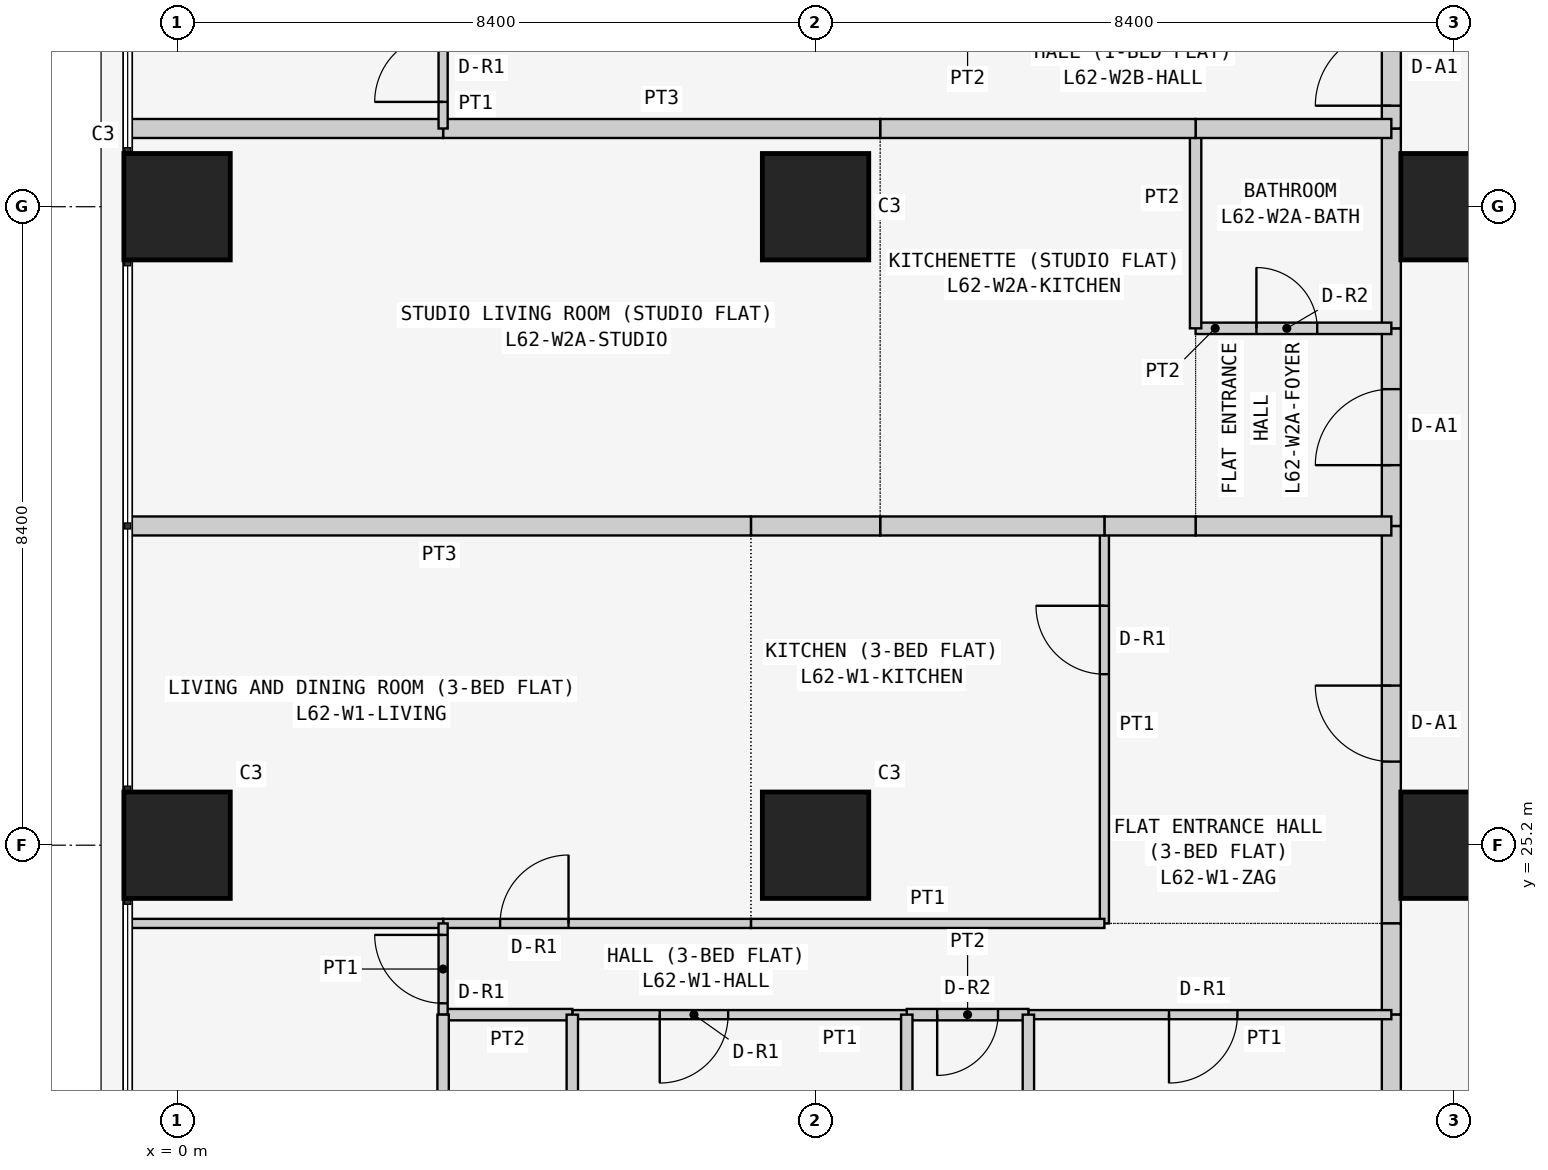
"""IFC4 building model, lengths in metres.
Left out: names, types, materials, properties, quantities, classifications, styles, units other than length and angle.
Written with IfcOpenShell. Run it as: python <this file> out.ifc"""

import sys

from ifc_helpers import new_model, si_unit, direction, frame, frame_2d, origin, origin_2d, place, context, subcontext, project, spatial, rectangle, extrude, element, fill, save


model = new_model("IFC4")
c1 = context("Model", 3, precision=1e-05, world=origin(), true_north=direction((0.0, 1.0)))
c2 = subcontext(c1, "Body", "Model", "MODEL_VIEW")
j1 = project(units=[si_unit("LENGTHUNIT", "METRE"), si_unit("PLANEANGLEUNIT", "RADIAN")], contexts=[c1])
p1 = place(None, origin())
s1 = spatial("IfcSite", under=j1, at=p1, CompositionType="ELEMENT")
p2 = place(p1, origin())
s2 = spatial("IfcBuilding", under=s1, at=p2, CompositionType="ELEMENT")
p3 = place(p2, frame((0.0, 0.0, 237.3)))
s3 = spatial("IfcBuildingStorey", under=s2, at=p3, CompositionType="ELEMENT", Elevation=237.3)
for number, where, z_axis, x_axis in (
    (1, (0.0, 25.2, 0.0), (0.0, 0.0, 1.0), (1.0, 0.0, 0.0)),
    (2, (0.0, 33.6, 0.0), (0.0, 0.0, 1.0), (1.0, 0.0, 0.0)),
    (3, (8.4, 25.2, 0.0), (0.0, 0.0, 1.0), (1.0, 0.0, 0.0)),
    (4, (8.4, 33.6, 0.0), (0.0, 0.0, 1.0), (1.0, 0.0, 0.0)),
    (5, (16.8, 25.2, 0.0), (0.0, 0.0, 1.0), (1.0, 0.0, 0.0)),
    (6, (16.8, 33.6, 0.0), (0.0, 0.0, 1.0), (1.0, 0.0, 0.0)),
):
    element("IfcColumn", number, at=place(p3, frame(where, z_axis=z_axis, x_axis=x_axis)), inside=s3, PredefinedType="COLUMN", context=c2, shape_type="SweptSolid", body=[
        extrude(rectangle(XDim=1.4, YDim=1.4, at=origin_2d()), origin(), (0.0, 0.0, 1.0), 3.6),
    ])
p4 = place(p3, frame((15.975, 24.171, 0.0), z_axis=(0.0, 0.0, 1.0), x_axis=(0.0, 1.0, 0.0)))
e7 = element("IfcWall", 7, at=p4, inside=s3, PredefinedType="PARTITIONING", context=c2, shape_type="SweptSolid", body=[
    extrude(rectangle(XDim=5.229, YDim=0.25, at=frame_2d((2.615, 0.0))), origin(), (0.0, 0.0, 1.0), 3.45),
])
p5 = place(p4, frame((2.129, 0.0, 0.0)))
e8 = element("IfcOpeningElement", 8, at=p5, cuts=e7, PredefinedType="OPENING", context=c2, shape_type="SweptSolid", body=[
    extrude(rectangle(XDim=1.0, YDim=2.1, at=frame_2d((0.5, 1.05))), frame((0.0, 0.135, 0.0), z_axis=(0.0, -1.0, 0.0), x_axis=(1.0, 0.0, 0.0)), (0.0, 0.0, 1.0), 0.27),
])
p6 = place(p3, frame((15.975, 22.971, 0.0), z_axis=(0.0, 0.0, 1.0), x_axis=(0.0, 1.0, 0.0)))
e9 = element("IfcWall", 9, at=p6, inside=s3, PredefinedType="PARTITIONING", context=c2, shape_type="SweptSolid", body=[
    extrude(rectangle(XDim=1.2, YDim=0.25, at=frame_2d((0.6, 0.0))), origin(), (0.0, 0.0, 1.0), 3.45),
])
p7 = place(p3, frame((15.975, 16.1, 0.0), z_axis=(0.0, 0.0, 1.0), x_axis=(0.0, 1.0, 0.0)))
e10 = element("IfcWall", 10, at=p7, inside=s3, PredefinedType="PARTITIONING", context=c2, shape_type="SweptSolid", body=[
    extrude(rectangle(XDim=6.871, YDim=0.25, at=frame_2d((3.436, 0.0))), origin(), (0.0, 0.0, 1.0), 3.45),
])
p8 = place(p3, frame((15.975, 29.4, 0.0), z_axis=(0.0, 0.0, 1.0), x_axis=(0.0, 1.0, 0.0)))
e11 = element("IfcWall", 11, at=p8, inside=s3, PredefinedType="PARTITIONING", context=c2, shape_type="SweptSolid", body=[
    extrude(rectangle(XDim=2.6, YDim=0.25, at=frame_2d((1.3, 0.0))), origin(), (0.0, 0.0, 1.0), 3.45),
])
p9 = place(p8, frame((0.8, 0.0, 0.0)))
e12 = element("IfcOpeningElement", 12, at=p9, cuts=e11, PredefinedType="OPENING", context=c2, shape_type="SweptSolid", body=[
    extrude(rectangle(XDim=1.0, YDim=2.1, at=frame_2d((0.5, 1.05))), frame((0.0, 0.135, 0.0), z_axis=(0.0, -1.0, 0.0), x_axis=(1.0, 0.0, 0.0)), (0.0, 0.0, 1.0), 0.27),
])
p10 = place(p3, frame((15.975, 32.0, 0.0), z_axis=(0.0, 0.0, 1.0), x_axis=(0.0, 1.0, 0.0)))
e13 = element("IfcWall", 13, at=p10, inside=s3, PredefinedType="PARTITIONING", context=c2, shape_type="SweptSolid", body=[
    extrude(rectangle(XDim=2.629, YDim=0.25, at=frame_2d((1.314, 0.0))), origin(), (0.0, 0.0, 1.0), 3.45),
])
p11 = place(p3, frame((15.975, 34.629, 0.0), z_axis=(0.0, 0.0, 1.0), x_axis=(0.0, 1.0, 0.0)))
e14 = element("IfcWall", 14, at=p11, inside=s3, PredefinedType="PARTITIONING", context=c2, shape_type="SweptSolid", body=[
    extrude(rectangle(XDim=1.6, YDim=0.25, at=frame_2d((0.8, 0.0))), origin(), (0.0, 0.0, 1.0), 3.45),
])
p12 = place(p11, frame((0.3, 0.0, 0.0)))
e15 = element("IfcOpeningElement", 15, at=p12, cuts=e14, PredefinedType="OPENING", context=c2, shape_type="SweptSolid", body=[
    extrude(rectangle(XDim=1.0, YDim=2.1, at=frame_2d((0.5, 1.05))), frame((0.0, 0.135, 0.0), z_axis=(0.0, -1.0, 0.0), x_axis=(1.0, 0.0, 0.0)), (0.0, 0.0, 1.0), 0.27),
])
p13 = place(p3, frame((12.2, 29.4, 0.0), z_axis=(0.0, 0.0, 1.0), x_axis=(0.0, -1.0, 0.0)))
e16 = element("IfcWall", 16, at=p13, inside=s3, PredefinedType="PARTITIONING", context=c2, shape_type="SweptSolid", body=[
    extrude(rectangle(XDim=5.229, YDim=0.12, at=frame_2d((2.615, 0.0))), origin(), (0.0, 0.0, 1.0), 3.45),
])
p14 = place(p13, frame((1.05, 0.0, 0.0)))
e17 = element("IfcOpeningElement", 17, at=p14, cuts=e16, PredefinedType="OPENING", context=c2, shape_type="SweptSolid", body=[
    extrude(rectangle(XDim=0.9, YDim=2.1, at=frame_2d((0.45, 1.05))), frame((0.0, 0.07, 0.0), z_axis=(0.0, -1.0, 0.0), x_axis=(1.0, 0.0, 0.0)), (0.0, 0.0, 1.0), 0.14),
])
p15 = place(p3, frame((15.975, 29.4, 0.0), z_axis=(0.0, 0.0, 1.0), x_axis=(-1.0, 0.0, 0.0)))
e18 = element("IfcWall", 18, at=p15, inside=s3, PredefinedType="PARTITIONING", context=c2, shape_type="SweptSolid", body=[
    extrude(rectangle(XDim=2.575, YDim=0.25, at=frame_2d((1.288, 0.0))), origin(), (0.0, 0.0, 1.0), 3.45),
])
p16 = place(p3, frame((13.4, 29.4, 0.0), z_axis=(0.0, 0.0, 1.0), x_axis=(-1.0, 0.0, 0.0)))
e19 = element("IfcWall", 19, at=p16, inside=s3, PredefinedType="PARTITIONING", context=c2, shape_type="SweptSolid", body=[
    extrude(rectangle(XDim=1.2, YDim=0.25, at=frame_2d((0.6, 0.0))), origin(), (0.0, 0.0, 1.0), 3.45),
])
p17 = place(p3, frame((7.55, 24.171, 0.0), z_axis=(0.0, 0.0, 1.0), x_axis=(1.0, 0.0, 0.0)))
e20 = element("IfcWall", 20, at=p17, inside=s3, PredefinedType="PARTITIONING", context=c2, shape_type="SweptSolid", body=[
    extrude(rectangle(XDim=4.65, YDim=0.12, at=frame_2d((2.325, 0.0))), origin(), (0.0, 0.0, 1.0), 3.45),
])
p18 = place(p3, frame((12.2, 29.4, 0.0), z_axis=(0.0, 0.0, 1.0), x_axis=(-1.0, 0.0, 0.0)))
e21 = element("IfcWall", 21, at=p18, inside=s3, PredefinedType="PARTITIONING", context=c2, shape_type="SweptSolid", body=[
    extrude(rectangle(XDim=2.95, YDim=0.25, at=frame_2d((1.475, 0.0))), origin(), (0.0, 0.0, 1.0), 3.45),
])
p19 = place(p3, frame((9.25, 29.4, 0.0), z_axis=(0.0, 0.0, 1.0), x_axis=(-1.0, 0.0, 0.0)))
e22 = element("IfcWall", 22, at=p19, inside=s3, PredefinedType="PARTITIONING", context=c2, shape_type="SweptSolid", body=[
    extrude(rectangle(XDim=1.7, YDim=0.25, at=frame_2d((0.85, 0.0))), origin(), (0.0, 0.0, 1.0), 3.45),
])
p20 = place(p3, frame((3.5, 24.171, 0.0), z_axis=(0.0, 0.0, 1.0), x_axis=(1.0, 0.0, 0.0)))
e23 = element("IfcWall", 23, at=p20, inside=s3, PredefinedType="PARTITIONING", context=c2, shape_type="SweptSolid", body=[
    extrude(rectangle(XDim=4.05, YDim=0.12, at=frame_2d((2.025, 0.0))), origin(), (0.0, 0.0, 1.0), 3.45),
])
p21 = place(p20, frame((0.75, 0.0, 0.0)))
e24 = element("IfcOpeningElement", 24, at=p21, cuts=e23, PredefinedType="OPENING", context=c2, shape_type="SweptSolid", body=[
    extrude(rectangle(XDim=0.9, YDim=2.1, at=frame_2d((0.45, 1.05))), frame((0.0, 0.07, 0.0), z_axis=(0.0, -1.0, 0.0), x_axis=(1.0, 0.0, 0.0)), (0.0, 0.0, 1.0), 0.14),
])
p22 = place(p3, frame((-0.65, 24.171, 0.0), z_axis=(0.0, 0.0, 1.0), x_axis=(1.0, 0.0, 0.0)))
e25 = element("IfcWall", 25, at=p22, inside=s3, PredefinedType="PARTITIONING", context=c2, shape_type="SweptSolid", body=[
    extrude(rectangle(XDim=4.15, YDim=0.12, at=frame_2d((2.075, 0.0))), origin(), (0.0, 0.0, 1.0), 3.45),
])
p23 = place(p3, frame((7.55, 29.4, 0.0), z_axis=(0.0, 0.0, 1.0), x_axis=(-1.0, 0.0, 0.0)))
e26 = element("IfcWall", 26, at=p23, inside=s3, PredefinedType="PARTITIONING", context=c2, shape_type="SweptSolid", body=[
    extrude(rectangle(XDim=8.2, YDim=0.25, at=frame_2d((4.1, 0.0))), origin(), (0.0, 0.0, 1.0), 3.45),
])
p24 = place(p3, frame((11.2, 22.971, 0.0), z_axis=(0.0, 0.0, 1.0), x_axis=(1.0, 0.0, 0.0)))
e27 = element("IfcWall", 27, at=p24, inside=s3, PredefinedType="PARTITIONING", context=c2, shape_type="SweptSolid", body=[
    extrude(rectangle(XDim=4.775, YDim=0.12, at=frame_2d((2.388, 0.0))), origin(), (0.0, 0.0, 1.0), 3.45),
])
p25 = place(p24, frame((1.85, 0.0, 0.0)))
e28 = element("IfcOpeningElement", 28, at=p25, cuts=e27, PredefinedType="OPENING", context=c2, shape_type="SweptSolid", body=[
    extrude(rectangle(XDim=0.9, YDim=2.1, at=frame_2d((0.45, 1.05))), frame((0.0, 0.07, 0.0), z_axis=(0.0, -1.0, 0.0), x_axis=(1.0, 0.0, 0.0)), (0.0, 0.0, 1.0), 0.14),
])
p26 = place(p3, frame((9.6, 22.971, 0.0), z_axis=(0.0, 0.0, 1.0), x_axis=(1.0, 0.0, 0.0)))
e29 = element("IfcWall", 29, at=p26, inside=s3, PredefinedType="PARTITIONING", context=c2, shape_type="SweptSolid", body=[
    extrude(rectangle(XDim=1.6, YDim=0.15, at=frame_2d((0.8, 0.0))), origin(), (0.0, 0.0, 1.0), 3.45),
])
p27 = place(p26, frame((0.4, 0.0, 0.0)))
e30 = element("IfcOpeningElement", 30, at=p27, cuts=e29, PredefinedType="OPENING", context=c2, shape_type="SweptSolid", body=[
    extrude(rectangle(XDim=0.8, YDim=2.1, at=frame_2d((0.4, 1.05))), frame((0.0, 0.085, 0.0), z_axis=(0.0, -1.0, 0.0), x_axis=(1.0, 0.0, 0.0)), (0.0, 0.0, 1.0), 0.17),
])
p28 = place(p3, frame((5.2, 22.971, 0.0), z_axis=(0.0, 0.0, 1.0), x_axis=(1.0, 0.0, 0.0)))
e31 = element("IfcWall", 31, at=p28, inside=s3, PredefinedType="PARTITIONING", context=c2, shape_type="SweptSolid", body=[
    extrude(rectangle(XDim=4.4, YDim=0.12, at=frame_2d((2.2, 0.0))), origin(), (0.0, 0.0, 1.0), 3.45),
])
p29 = place(p28, frame((1.15, 0.0, 0.0)))
e32 = element("IfcOpeningElement", 32, at=p29, cuts=e31, PredefinedType="OPENING", context=c2, shape_type="SweptSolid", body=[
    extrude(rectangle(XDim=0.9, YDim=2.1, at=frame_2d((0.45, 1.05))), frame((0.0, 0.07, 0.0), z_axis=(0.0, -1.0, 0.0), x_axis=(1.0, 0.0, 0.0)), (0.0, 0.0, 1.0), 0.14),
])
p30 = place(p3, frame((3.5, 22.971, 0.0), z_axis=(0.0, 0.0, 1.0), x_axis=(1.0, 0.0, 0.0)))
e33 = element("IfcWall", 33, at=p30, inside=s3, PredefinedType="PARTITIONING", context=c2, shape_type="SweptSolid", body=[
    extrude(rectangle(XDim=1.7, YDim=0.15, at=frame_2d((0.85, 0.0))), origin(), (0.0, 0.0, 1.0), 3.45),
])
p31 = place(p3, frame((3.5, 24.171, 0.0), z_axis=(0.0, 0.0, 1.0), x_axis=(0.0, -1.0, 0.0)))
e34 = element("IfcWall", 34, at=p31, inside=s3, PredefinedType="PARTITIONING", context=c2, shape_type="SweptSolid", body=[
    extrude(rectangle(XDim=1.2, YDim=0.12, at=frame_2d((0.6, 0.0))), origin(), (0.0, 0.0, 1.0), 3.45),
])
p32 = place(p31, frame((0.151, 0.0, 0.0)))
e35 = element("IfcOpeningElement", 35, at=p32, cuts=e34, PredefinedType="OPENING", context=c2, shape_type="SweptSolid", body=[
    extrude(rectangle(XDim=0.9, YDim=2.1, at=frame_2d((0.45, 1.05))), frame((0.0, 0.07, 0.0), z_axis=(0.0, -1.0, 0.0), x_axis=(1.0, 0.0, 0.0)), (0.0, 0.0, 1.0), 0.14),
])
for number, where, z_axis, x_axis in (
    (36, (11.2, 22.971, 0.0), (0.0, 0.0, 1.0), (0.0, -1.0, 0.0)),
    (37, (9.6, 22.971, 0.0), (0.0, 0.0, 1.0), (0.0, -1.0, 0.0)),
    (38, (5.2, 22.971, 0.0), (0.0, 0.0, 1.0), (0.0, -1.0, 0.0)),
):
    element("IfcWall", number, at=place(p3, frame(where, z_axis=z_axis, x_axis=x_axis)), inside=s3, PredefinedType="PARTITIONING", context=c2, shape_type="SweptSolid", body=[
        extrude(rectangle(XDim=6.871, YDim=0.15, at=frame_2d((3.436, 0.0))), origin(), (0.0, 0.0, 1.0), 3.45),
    ])
p33 = place(p3, frame((3.5, 22.971, 0.0), z_axis=(0.0, 0.0, 1.0), x_axis=(0.0, -1.0, 0.0)))
e39 = element("IfcWall", 39, at=p33, inside=s3, PredefinedType="PARTITIONING", context=c2, shape_type="SweptSolid", body=[
    extrude(rectangle(XDim=6.871, YDim=0.15, at=frame_2d((3.436, 0.0))), origin(), (0.0, 0.0, 1.0), 3.45),
])
p34 = place(p33, frame((3.171, 0.0, 0.0)))
e40 = element("IfcOpeningElement", 40, at=p34, cuts=e39, PredefinedType="OPENING", context=c2, shape_type="SweptSolid", body=[
    extrude(rectangle(XDim=0.8, YDim=2.1, at=frame_2d((0.4, 1.05))), frame((0.0, 0.085, 0.0), z_axis=(0.0, -1.0, 0.0), x_axis=(1.0, 0.0, 0.0)), (0.0, 0.0, 1.0), 0.17),
])
p35 = place(p3, frame((13.4, 32.0, 0.0), z_axis=(0.0, 0.0, 1.0), x_axis=(1.0, 0.0, 0.0)))
e41 = element("IfcWall", 41, at=p35, inside=s3, PredefinedType="PARTITIONING", context=c2, shape_type="SweptSolid", body=[
    extrude(rectangle(XDim=2.575, YDim=0.15, at=frame_2d((1.288, 0.0))), origin(), (0.0, 0.0, 1.0), 3.45),
])
p36 = place(p35, frame((0.8, 0.0, 0.0)))
e42 = element("IfcOpeningElement", 42, at=p36, cuts=e41, PredefinedType="OPENING", context=c2, shape_type="SweptSolid", body=[
    extrude(rectangle(XDim=0.8, YDim=2.1, at=frame_2d((0.4, 1.05))), frame((0.0, 0.085, 0.0), z_axis=(0.0, -1.0, 0.0), x_axis=(1.0, 0.0, 0.0)), (0.0, 0.0, 1.0), 0.17),
])
p37 = place(p3, frame((13.4, 32.0, 0.0), z_axis=(0.0, 0.0, 1.0), x_axis=(0.0, 1.0, 0.0)))
e43 = element("IfcWall", 43, at=p37, inside=s3, PredefinedType="PARTITIONING", context=c2, shape_type="SweptSolid", body=[
    extrude(rectangle(XDim=2.629, YDim=0.15, at=frame_2d((1.314, 0.0))), origin(), (0.0, 0.0, 1.0), 3.45),
])
p38 = place(p3, frame((13.4, 34.629, 0.0), z_axis=(0.0, 0.0, 1.0), x_axis=(1.0, 0.0, 0.0)))
e44 = element("IfcWall", 44, at=p38, inside=s3, PredefinedType="PARTITIONING", context=c2, shape_type="SweptSolid", body=[
    extrude(rectangle(XDim=2.575, YDim=0.25, at=frame_2d((1.288, 0.0))), origin(), (0.0, 0.0, 1.0), 3.45),
])
p39 = place(p3, frame((9.25, 34.629, 0.0), z_axis=(0.0, 0.0, 1.0), x_axis=(1.0, 0.0, 0.0)))
e45 = element("IfcWall", 45, at=p39, inside=s3, PredefinedType="PARTITIONING", context=c2, shape_type="SweptSolid", body=[
    extrude(rectangle(XDim=4.15, YDim=0.25, at=frame_2d((2.075, 0.0))), origin(), (0.0, 0.0, 1.0), 3.45),
])
p40 = place(p3, frame((3.5, 34.629, 0.0), z_axis=(0.0, 0.0, 1.0), x_axis=(1.0, 0.0, 0.0)))
e46 = element("IfcWall", 46, at=p40, inside=s3, PredefinedType="PARTITIONING", context=c2, shape_type="SweptSolid", body=[
    extrude(rectangle(XDim=5.75, YDim=0.25, at=frame_2d((2.875, 0.0))), origin(), (0.0, 0.0, 1.0), 3.45),
])
p41 = place(p3, frame((-0.65, 34.629, 0.0), z_axis=(0.0, 0.0, 1.0), x_axis=(1.0, 0.0, 0.0)))
e47 = element("IfcWall", 47, at=p41, inside=s3, PredefinedType="PARTITIONING", context=c2, shape_type="SweptSolid", body=[
    extrude(rectangle(XDim=4.15, YDim=0.25, at=frame_2d((2.075, 0.0))), origin(), (0.0, 0.0, 1.0), 3.45),
])
p42 = place(p3, frame((3.5, 34.629, 0.0), z_axis=(0.0, 0.0, 1.0), x_axis=(0.0, 1.0, 0.0)))
e48 = element("IfcWall", 48, at=p42, inside=s3, PredefinedType="PARTITIONING", context=c2, shape_type="SweptSolid", body=[
    extrude(rectangle(XDim=1.6, YDim=0.12, at=frame_2d((0.8, 0.0))), origin(), (0.0, 0.0, 1.0), 3.45),
])
p43 = place(p42, frame((0.35, 0.0, 0.0)))
e49 = element("IfcOpeningElement", 49, at=p43, cuts=e48, PredefinedType="OPENING", context=c2, shape_type="SweptSolid", body=[
    extrude(rectangle(XDim=0.9, YDim=2.1, at=frame_2d((0.45, 1.05))), frame((0.0, 0.07, 0.0), z_axis=(0.0, -1.0, 0.0), x_axis=(1.0, 0.0, 0.0)), (0.0, 0.0, 1.0), 0.14),
])
p44 = place(p5, origin())
e50 = element("IfcDoor", 50, at=p44, inside=s3, OperationType="SINGLE_SWING_RIGHT", PredefinedType="DOOR", context=c2, shape_type="SweptSolid", body=[
    extrude(rectangle(XDim=1.0, YDim=2.1, at=frame_2d((0.5, 1.05))), frame((0.0, 0.025, 0.0), z_axis=(0.0, -1.0, 0.0), x_axis=(1.0, 0.0, 0.0)), (0.0, 0.0, 1.0), 0.05),
])
fill(e8, e50)
p45 = place(p14, frame((0.9, 0.0, 0.0), z_axis=(0.0, 0.0, 1.0), x_axis=(-1.0, 0.0, 0.0)))
e51 = element("IfcDoor", 51, at=p45, inside=s3, OperationType="SINGLE_SWING_RIGHT", PredefinedType="DOOR", context=c2, shape_type="SweptSolid", body=[
    extrude(rectangle(XDim=0.9, YDim=2.1, at=frame_2d((0.45, 1.05))), frame((0.0, 0.025, 0.0), z_axis=(0.0, -1.0, 0.0), x_axis=(1.0, 0.0, 0.0)), (0.0, 0.0, 1.0), 0.05),
])
fill(e17, e51)
p46 = place(p21, origin())
e52 = element("IfcDoor", 52, at=p46, inside=s3, OperationType="SINGLE_SWING_RIGHT", PredefinedType="DOOR", context=c2, shape_type="SweptSolid", body=[
    extrude(rectangle(XDim=0.9, YDim=2.1, at=frame_2d((0.45, 1.05))), frame((0.0, 0.025, 0.0), z_axis=(0.0, -1.0, 0.0), x_axis=(1.0, 0.0, 0.0)), (0.0, 0.0, 1.0), 0.05),
])
fill(e24, e52)
p47 = place(p25, frame((0.9, 0.0, 0.0), z_axis=(0.0, 0.0, 1.0), x_axis=(-1.0, 0.0, 0.0)))
e53 = element("IfcDoor", 53, at=p47, inside=s3, OperationType="SINGLE_SWING_RIGHT", PredefinedType="DOOR", context=c2, shape_type="SweptSolid", body=[
    extrude(rectangle(XDim=0.9, YDim=2.1, at=frame_2d((0.45, 1.05))), frame((0.0, 0.025, 0.0), z_axis=(0.0, -1.0, 0.0), x_axis=(1.0, 0.0, 0.0)), (0.0, 0.0, 1.0), 0.05),
])
fill(e28, e53)
p48 = place(p27, frame((0.8, 0.0, 0.0), z_axis=(0.0, 0.0, 1.0), x_axis=(-1.0, 0.0, 0.0)))
e54 = element("IfcDoor", 54, at=p48, inside=s3, OperationType="SINGLE_SWING_RIGHT", PredefinedType="DOOR", context=c2, shape_type="SweptSolid", body=[
    extrude(rectangle(XDim=0.8, YDim=2.1, at=frame_2d((0.4, 1.05))), frame((0.0, 0.025, 0.0), z_axis=(0.0, -1.0, 0.0), x_axis=(1.0, 0.0, 0.0)), (0.0, 0.0, 1.0), 0.05),
])
fill(e30, e54)
p49 = place(p29, frame((0.9, 0.0, 0.0), z_axis=(0.0, 0.0, 1.0), x_axis=(-1.0, 0.0, 0.0)))
e55 = element("IfcDoor", 55, at=p49, inside=s3, OperationType="SINGLE_SWING_RIGHT", PredefinedType="DOOR", context=c2, shape_type="SweptSolid", body=[
    extrude(rectangle(XDim=0.9, YDim=2.1, at=frame_2d((0.45, 1.05))), frame((0.0, 0.025, 0.0), z_axis=(0.0, -1.0, 0.0), x_axis=(1.0, 0.0, 0.0)), (0.0, 0.0, 1.0), 0.05),
])
fill(e32, e55)
p50 = place(p32, frame((0.9, 0.0, 0.0), z_axis=(0.0, 0.0, 1.0), x_axis=(-1.0, 0.0, 0.0)))
e56 = element("IfcDoor", 56, at=p50, inside=s3, OperationType="SINGLE_SWING_RIGHT", PredefinedType="DOOR", context=c2, shape_type="SweptSolid", body=[
    extrude(rectangle(XDim=0.9, YDim=2.1, at=frame_2d((0.45, 1.05))), frame((0.0, 0.025, 0.0), z_axis=(0.0, -1.0, 0.0), x_axis=(1.0, 0.0, 0.0)), (0.0, 0.0, 1.0), 0.05),
])
fill(e35, e56)
p51 = place(p9, origin())
e57 = element("IfcDoor", 57, at=p51, inside=s3, OperationType="SINGLE_SWING_LEFT", PredefinedType="DOOR", context=c2, shape_type="SweptSolid", body=[
    extrude(rectangle(XDim=1.0, YDim=2.1, at=frame_2d((0.5, 1.05))), frame((0.0, 0.025, 0.0), z_axis=(0.0, -1.0, 0.0), x_axis=(1.0, 0.0, 0.0)), (0.0, 0.0, 1.0), 0.05),
])
fill(e12, e57)
p52 = place(p36, origin())
e58 = element("IfcDoor", 58, at=p52, inside=s3, OperationType="SINGLE_SWING_LEFT", PredefinedType="DOOR", context=c2, shape_type="SweptSolid", body=[
    extrude(rectangle(XDim=0.8, YDim=2.1, at=frame_2d((0.4, 1.05))), frame((0.0, 0.025, 0.0), z_axis=(0.0, -1.0, 0.0), x_axis=(1.0, 0.0, 0.0)), (0.0, 0.0, 1.0), 0.05),
])
fill(e42, e58)
p53 = place(p12, origin())
e59 = element("IfcDoor", 59, at=p53, inside=s3, OperationType="SINGLE_SWING_LEFT", PredefinedType="DOOR", context=c2, shape_type="SweptSolid", body=[
    extrude(rectangle(XDim=1.0, YDim=2.1, at=frame_2d((0.5, 1.05))), frame((0.0, 0.025, 0.0), z_axis=(0.0, -1.0, 0.0), x_axis=(1.0, 0.0, 0.0)), (0.0, 0.0, 1.0), 0.05),
])
fill(e15, e59)
p54 = place(p43, origin())
e60 = element("IfcDoor", 60, at=p54, inside=s3, OperationType="SINGLE_SWING_LEFT", PredefinedType="DOOR", context=c2, shape_type="SweptSolid", body=[
    extrude(rectangle(XDim=0.9, YDim=2.1, at=frame_2d((0.45, 1.05))), frame((0.0, 0.025, 0.0), z_axis=(0.0, -1.0, 0.0), x_axis=(1.0, 0.0, 0.0)), (0.0, 0.0, 1.0), 0.05),
])
fill(e49, e60)
save(model, sys.argv[1])
